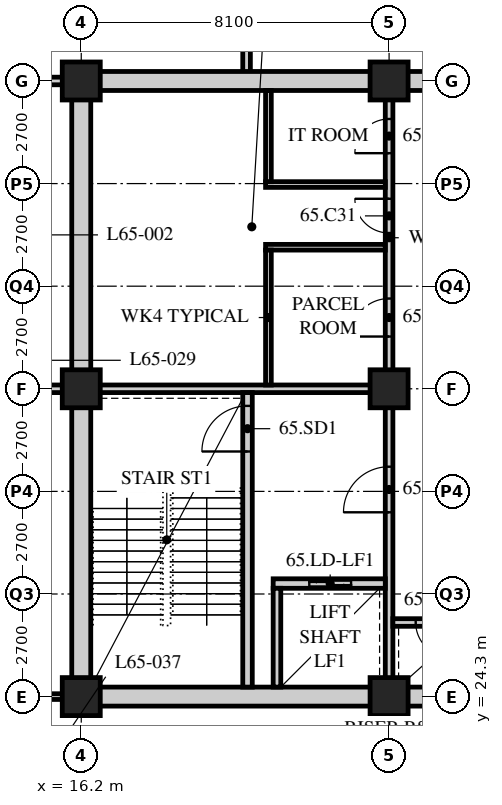
"""IFC4 building model, lengths in metres.
Left out: names, types, materials, properties, quantities, classifications, styles, units other than length and angle.
Written with IfcOpenShell. Run it as: python <this file> out.ifc"""

import sys

from ifc_helpers import new_model, si_unit, direction, frame, frame_2d, origin, origin_2d, place, context, subcontext, project, spatial, rectangle, hollow_rectangle, extrude, element, fill, save


model = new_model("IFC4")
c1 = context("Model", 3, precision=1e-05, world=origin(), true_north=direction((0.0, 1.0)))
c2 = subcontext(c1, "Body", "Model", "MODEL_VIEW")
j1 = project(units=[si_unit("LENGTHUNIT", "METRE"), si_unit("PLANEANGLEUNIT", "RADIAN")], contexts=[c1])
p1 = place(None, origin())
s1 = spatial("IfcSite", under=j1, at=p1, CompositionType="ELEMENT")
p2 = place(p1, origin())
s2 = spatial("IfcBuilding", under=s1, at=p2, CompositionType="ELEMENT")
p3 = place(p2, frame((0.0, 0.0, 254.1)))
s3 = spatial("IfcBuildingStorey", under=s2, at=p3, CompositionType="ELEMENT", Elevation=254.1)
for number, where, z_axis, x_axis in (
    (1, (16.2, 24.3, 0.0), (0.0, 0.0, 1.0), (1.0, 0.0, 0.0)),
    (2, (16.2, 32.4, 0.0), (0.0, 0.0, 1.0), (1.0, 0.0, 0.0)),
    (3, (16.2, 40.5, 0.0), (0.0, 0.0, 1.0), (1.0, 0.0, 0.0)),
    (4, (24.3, 24.3, 0.0), (0.0, 0.0, 1.0), (1.0, 0.0, 0.0)),
    (5, (24.3, 32.4, 0.0), (0.0, 0.0, 1.0), (1.0, 0.0, 0.0)),
    (6, (24.3, 40.5, 0.0), (0.0, 0.0, 1.0), (1.0, 0.0, 0.0)),
):
    element("IfcColumn", number, at=place(p3, frame(where, z_axis=z_axis, x_axis=x_axis)), inside=s3, PredefinedType="COLUMN", context=c2, shape_type="SweptSolid", body=[
        extrude(hollow_rectangle(XDim=1.0, YDim=1.0, WallThickness=0.1, at=origin_2d()), origin(), (0.0, 0.0, 1.0), 3.9),
    ])
p4 = place(p3, frame((16.0, 24.3, 0.0), z_axis=(0.0, 0.0, 1.0), x_axis=(-1.0, 0.0, 0.0)))
e7 = element("IfcWall", 7, at=p4, inside=s3, PredefinedType="PARTITIONING", context=c2, shape_type="SweptSolid", body=[
    extrude(rectangle(XDim=2.05, YDim=0.15, at=frame_2d((1.025, 0.0))), origin(), (0.0, 0.0, 1.0), 3.078),
])
p5 = place(p3, frame((13.95, 32.4, 0.0), z_axis=(0.0, 0.0, 1.0), x_axis=(1.0, 0.0, 0.0)))
e8 = element("IfcWall", 8, at=p5, inside=s3, PredefinedType="SOLIDWALL", context=c2, shape_type="SweptSolid", body=[
    extrude(rectangle(XDim=2.25, YDim=0.2, at=frame_2d((1.125, 0.0))), origin(), (0.0, 0.0, 1.0), 3.078),
])
p6 = place(p3, frame((20.55, 50.85, 0.0), z_axis=(0.0, 0.0, 1.0), x_axis=(0.0, -1.0, 0.0)))
e9 = element("IfcWall", 9, at=p6, inside=s3, PredefinedType="SOLIDWALL", context=c2, shape_type="SweptSolid", body=[
    extrude(rectangle(XDim=10.35, YDim=0.2, at=frame_2d((5.175, 0.0))), origin(), (0.0, 0.0, 1.0), 3.69),
])
p7 = place(p3, frame((13.95, 40.5, 0.0), z_axis=(0.0, 0.0, 1.0), x_axis=(1.0, 0.0, 0.0)))
e10 = element("IfcWall", 10, at=p7, inside=s3, PredefinedType="SOLIDWALL", context=c2, shape_type="SweptSolid", body=[
    extrude(rectangle(XDim=2.25, YDim=0.2, at=frame_2d((1.125, 0.0))), origin(), (0.0, 0.0, 1.0), 3.078),
])
p8 = place(p3, frame((15.95, 24.3, 0.0), z_axis=(0.0, 0.0, 1.0), x_axis=(1.0, 0.0, 0.0)))
e11 = element("IfcWall", 11, at=p8, inside=s3, PredefinedType="SOLIDWALL", context=c2, shape_type="SweptSolid", body=[
    extrude(rectangle(XDim=24.55, YDim=0.5, at=frame_2d((12.275, 0.0))), origin(), (0.0, 0.0, 1.0), 3.04),
])
p9 = place(p8, frame((11.5, 0.0, 0.0)))
e12 = element("IfcOpeningElement", 12, at=p9, cuts=e11, PredefinedType="OPENING", context=c2, shape_type="SweptSolid", body=[
    extrude(rectangle(XDim=1.8, YDim=2.4, at=frame_2d((0.9, 1.2))), frame((0.0, 0.26, 0.0), z_axis=(0.0, -1.0, 0.0), x_axis=(1.0, 0.0, 0.0)), (0.0, 0.0, 1.0), 0.52),
])
p10 = place(p3, frame((15.95, 40.5, 0.0), z_axis=(0.0, 0.0, 1.0), x_axis=(1.0, 0.0, 0.0)))
e13 = element("IfcWall", 13, at=p10, inside=s3, PredefinedType="SOLIDWALL", context=c2, shape_type="SweptSolid", body=[
    extrude(rectangle(XDim=24.55, YDim=0.5, at=frame_2d((12.275, 0.0))), origin(), (0.0, 0.0, 1.0), 3.04),
])
p11 = place(p10, frame((11.5, 0.0, 0.0)))
e14 = element("IfcOpeningElement", 14, at=p11, cuts=e13, PredefinedType="OPENING", context=c2, shape_type="SweptSolid", body=[
    extrude(rectangle(XDim=1.8, YDim=2.4, at=frame_2d((0.9, 1.2))), frame((0.0, 0.26, 0.0), z_axis=(0.0, -1.0, 0.0), x_axis=(1.0, 0.0, 0.0)), (0.0, 0.0, 1.0), 0.52),
])
p12 = place(p3, frame((16.2, 24.55, 0.0), z_axis=(0.0, 0.0, 1.0), x_axis=(0.0, 1.0, 0.0)))
e15 = element("IfcWall", 15, at=p12, inside=s3, PredefinedType="SOLIDWALL", context=c2, shape_type="SweptSolid", body=[
    extrude(rectangle(XDim=15.7, YDim=0.5, at=frame_2d((7.85, 0.0))), origin(), (0.0, 0.0, 1.0), 3.078),
])
p13 = place(p3, frame((16.45, 32.4, 0.0), z_axis=(0.0, 0.0, 1.0), x_axis=(1.0, 0.0, 0.0)))
e16 = element("IfcWall", 16, at=p13, inside=s3, PredefinedType="SOLIDWALL", context=c2, shape_type="SweptSolid", body=[
    extrude(rectangle(XDim=7.95, YDim=0.2, at=frame_2d((3.975, 0.0))), origin(), (0.0, 0.0, 1.0), 3.078),
])
p14 = place(p3, frame((24.3, 24.55, 0.0), z_axis=(0.0, 0.0, 1.0), x_axis=(0.0, 1.0, 0.0)))
e17 = element("IfcWall", 17, at=p14, inside=s3, PredefinedType="SOLIDWALL", context=c2, shape_type="SweptSolid", body=[
    extrude(rectangle(XDim=7.75, YDim=0.2, at=frame_2d((3.875, 0.0))), origin(), (0.0, 0.0, 1.0), 3.078),
])
p15 = place(p14, frame((4.6, 0.0, 0.0)))
e18 = element("IfcOpeningElement", 18, at=p15, cuts=e17, PredefinedType="OPENING", context=c2, shape_type="SweptSolid", body=[
    extrude(rectangle(XDim=1.2, YDim=2.1, at=frame_2d((0.6, 1.05))), frame((0.0, 0.11, 0.0), z_axis=(0.0, -1.0, 0.0), x_axis=(1.0, 0.0, 0.0)), (0.0, 0.0, 1.0), 0.22),
])
p16 = place(p3, frame((20.575, 24.55, 0.0), z_axis=(0.0, 0.0, 1.0), x_axis=(0.0, 1.0, 0.0)))
e19 = element("IfcWall", 19, at=p16, inside=s3, PredefinedType="SOLIDWALL", context=c2, shape_type="SweptSolid", body=[
    extrude(rectangle(XDim=7.75, YDim=0.25, at=frame_2d((3.875, 0.0))), origin(), (0.0, 0.0, 1.0), 3.69),
])
p17 = place(p16, frame((6.2, 0.0, 0.0)))
e20 = element("IfcOpeningElement", 20, at=p17, cuts=e19, PredefinedType="OPENING", context=c2, shape_type="SweptSolid", body=[
    extrude(rectangle(XDim=1.2, YDim=2.1, at=frame_2d((0.6, 1.05))), frame((0.0, 0.135, 0.0), z_axis=(0.0, -1.0, 0.0), x_axis=(1.0, 0.0, 0.0)), (0.0, 0.0, 1.0), 0.27),
])
p18 = place(p3, frame((21.25, 27.275, 0.0), z_axis=(0.0, 0.0, 1.0), x_axis=(1.0, 0.0, 0.0)))
e21 = element("IfcWall", 21, at=p18, inside=s3, PredefinedType="SOLIDWALL", context=c2, shape_type="SweptSolid", body=[
    extrude(rectangle(XDim=2.95, YDim=0.25, at=frame_2d((1.475, 0.0))), origin(), (0.0, 0.0, 1.0), 3.69),
])
p19 = place(p18, frame((0.95, 0.0, 0.0)))
e22 = element("IfcOpeningElement", 22, at=p19, cuts=e21, PredefinedType="OPENING", context=c2, shape_type="SweptSolid", body=[
    extrude(rectangle(XDim=1.1, YDim=2.4, at=frame_2d((0.55, 1.2))), frame((0.0, 0.135, 0.0), z_axis=(0.0, -1.0, 0.0), x_axis=(1.0, 0.0, 0.0)), (0.0, 0.0, 1.0), 0.27),
])
p20 = place(p3, frame((21.35, 24.55, 0.0), z_axis=(0.0, 0.0, 1.0), x_axis=(0.0, 1.0, 0.0)))
e23 = element("IfcWall", 23, at=p20, inside=s3, PredefinedType="SOLIDWALL", context=c2, shape_type="SweptSolid", body=[
    extrude(rectangle(XDim=2.6, YDim=0.2, at=frame_2d((1.3, 0.0))), origin(), (0.0, 0.0, 1.0), 3.69),
])
p21 = place(p3, frame((24.4, 26.25, 0.0), z_axis=(0.0, 0.0, 1.0), x_axis=(1.0, 0.0, 0.0)))
e24 = element("IfcWall", 24, at=p21, inside=s3, PredefinedType="SOLIDWALL", context=c2, shape_type="SweptSolid", body=[
    extrude(rectangle(XDim=2.15, YDim=0.2, at=frame_2d((1.075, 0.0))), origin(), (0.0, 0.0, 1.0), 3.69),
])
p22 = place(p21, frame((0.6, 0.0, 0.0)))
e25 = element("IfcOpeningElement", 25, at=p22, cuts=e24, PredefinedType="OPENING", context=c2, shape_type="SweptSolid", body=[
    extrude(rectangle(XDim=0.9, YDim=2.1, at=frame_2d((0.45, 1.05))), frame((0.0, 0.11, 0.0), z_axis=(0.0, -1.0, 0.0), x_axis=(1.0, 0.0, 0.0)), (0.0, 0.0, 1.0), 0.22),
])
p23 = place(p3, frame((24.3, 32.5, 0.0), z_axis=(0.0, 0.0, 1.0), x_axis=(0.0, 1.0, 0.0)))
e26 = element("IfcWall", 26, at=p23, inside=s3, PredefinedType="PARTITIONING", context=c2, shape_type="SweptSolid", body=[
    extrude(rectangle(XDim=7.75, YDim=0.2, at=frame_2d((3.875, 0.0))), origin(), (0.0, 0.0, 1.0), 3.078),
])
p24 = place(p23, frame((1.275, 0.0, 0.0)))
e27 = element("IfcOpeningElement", 27, at=p24, cuts=e26, PredefinedType="OPENING", context=c2, shape_type="SweptSolid", body=[
    extrude(rectangle(XDim=1.0, YDim=2.1, at=frame_2d((0.5, 1.05))), frame((0.0, 0.11, 0.0), z_axis=(0.0, -1.0, 0.0), x_axis=(1.0, 0.0, 0.0)), (0.0, 0.0, 1.0), 0.22),
])
p25 = place(p23, frame((4.0, 0.0, 0.0)))
e28 = element("IfcOpeningElement", 28, at=p25, cuts=e26, PredefinedType="OPENING", context=c2, shape_type="SweptSolid", body=[
    extrude(rectangle(XDim=0.9, YDim=2.1, at=frame_2d((0.45, 1.05))), frame((0.0, 0.11, 0.0), z_axis=(0.0, -1.0, 0.0), x_axis=(1.0, 0.0, 0.0)), (0.0, 0.0, 1.0), 0.22),
])
p26 = place(p23, frame((6.1, 0.0, 0.0)))
e29 = element("IfcOpeningElement", 29, at=p26, cuts=e26, PredefinedType="OPENING", context=c2, shape_type="SweptSolid", body=[
    extrude(rectangle(XDim=0.9, YDim=2.1, at=frame_2d((0.45, 1.05))), frame((0.0, 0.11, 0.0), z_axis=(0.0, -1.0, 0.0), x_axis=(1.0, 0.0, 0.0)), (0.0, 0.0, 1.0), 0.22),
])
for number, where, z_axis, x_axis in (
    (30, (21.05, 36.125, 0.0), (0.0, 0.0, 1.0), (1.0, 0.0, 0.0)),
    (31, (21.05, 37.775, 0.0), (0.0, 0.0, 1.0), (1.0, 0.0, 0.0)),
):
    element("IfcWall", number, at=place(p3, frame(where, z_axis=z_axis, x_axis=x_axis)), inside=s3, PredefinedType="PARTITIONING", context=c2, shape_type="SweptSolid", body=[
        extrude(rectangle(XDim=3.15, YDim=0.15, at=frame_2d((1.575, 0.0))), origin(), (0.0, 0.0, 1.0), 3.69),
    ])
p27 = place(p3, frame((21.125, 32.5, 0.0), z_axis=(0.0, 0.0, 1.0), x_axis=(0.0, 1.0, 0.0)))
e32 = element("IfcWall", 32, at=p27, inside=s3, PredefinedType="PARTITIONING", context=c2, shape_type="SweptSolid", body=[
    extrude(rectangle(XDim=3.55, YDim=0.15, at=frame_2d((1.775, 0.0))), origin(), (0.0, 0.0, 1.0), 3.69),
])
p28 = place(p3, frame((21.125, 37.85, 0.0), z_axis=(0.0, 0.0, 1.0), x_axis=(0.0, 1.0, 0.0)))
e33 = element("IfcWall", 33, at=p28, inside=s3, PredefinedType="PARTITIONING", context=c2, shape_type="SweptSolid", body=[
    extrude(rectangle(XDim=2.4, YDim=0.15, at=frame_2d((1.2, 0.0))), origin(), (0.0, 0.0, 1.0), 3.69),
])
p29 = place(p24, origin())
e34 = element("IfcDoor", 34, at=p29, inside=s3, OperationType="SINGLE_SWING_LEFT", PredefinedType="DOOR", context=c2, shape_type="SweptSolid", body=[
    extrude(rectangle(XDim=1.0, YDim=2.1, at=frame_2d((0.5, 1.05))), frame((0.0, 0.025, 0.0), z_axis=(0.0, -1.0, 0.0), x_axis=(1.0, 0.0, 0.0)), (0.0, 0.0, 1.0), 0.05),
])
fill(e27, e34)
p30 = place(p25, origin())
e35 = element("IfcDoor", 35, at=p30, inside=s3, OperationType="SINGLE_SWING_RIGHT", PredefinedType="DOOR", context=c2, shape_type="SweptSolid", body=[
    extrude(rectangle(XDim=0.9, YDim=2.1, at=frame_2d((0.45, 1.05))), frame((0.0, 0.025, 0.0), z_axis=(0.0, -1.0, 0.0), x_axis=(1.0, 0.0, 0.0)), (0.0, 0.0, 1.0), 0.05),
])
fill(e28, e35)
p31 = place(p26, origin())
e36 = element("IfcDoor", 36, at=p31, inside=s3, OperationType="SINGLE_SWING_LEFT", PredefinedType="DOOR", context=c2, shape_type="SweptSolid", body=[
    extrude(rectangle(XDim=0.9, YDim=2.1, at=frame_2d((0.45, 1.05))), frame((0.0, 0.025, 0.0), z_axis=(0.0, -1.0, 0.0), x_axis=(1.0, 0.0, 0.0)), (0.0, 0.0, 1.0), 0.05),
])
fill(e29, e36)
p32 = place(p17, origin())
e37 = element("IfcDoor", 37, at=p32, inside=s3, OperationType="SINGLE_SWING_LEFT", PredefinedType="DOOR", context=c2, shape_type="SweptSolid", body=[
    extrude(rectangle(XDim=1.2, YDim=2.1, at=frame_2d((0.6, 1.05))), frame((0.0, 0.025, 0.0), z_axis=(0.0, -1.0, 0.0), x_axis=(1.0, 0.0, 0.0)), (0.0, 0.0, 1.0), 0.05),
])
fill(e20, e37)
p33 = place(p15, origin())
e38 = element("IfcDoor", 38, at=p33, inside=s3, OperationType="SINGLE_SWING_LEFT", PredefinedType="DOOR", context=c2, shape_type="SweptSolid", body=[
    extrude(rectangle(XDim=1.2, YDim=2.1, at=frame_2d((0.6, 1.05))), frame((0.0, 0.025, 0.0), z_axis=(0.0, -1.0, 0.0), x_axis=(1.0, 0.0, 0.0)), (0.0, 0.0, 1.0), 0.05),
])
fill(e18, e38)
p34 = place(p22, origin())
e39 = element("IfcDoor", 39, at=p34, inside=s3, OperationType="SINGLE_SWING_LEFT", PredefinedType="DOOR", context=c2, shape_type="SweptSolid", body=[
    extrude(rectangle(XDim=0.9, YDim=2.1, at=frame_2d((0.45, 1.05))), frame((0.0, 0.025, 0.0), z_axis=(0.0, -1.0, 0.0), x_axis=(1.0, 0.0, 0.0)), (0.0, 0.0, 1.0), 0.05),
])
fill(e25, e39)
p35 = place(p19, origin())
e40 = element("IfcDoor", 40, at=p35, inside=s3, OperationType="DOUBLE_DOOR_SLIDING", PredefinedType="DOOR", context=c2, shape_type="SweptSolid", body=[
    extrude(rectangle(XDim=1.1, YDim=2.4, at=frame_2d((0.55, 1.2))), frame((0.0, 0.025, 0.0), z_axis=(0.0, -1.0, 0.0), x_axis=(1.0, 0.0, 0.0)), (0.0, 0.0, 1.0), 0.05),
])
fill(e22, e40)
save(model, sys.argv[1])
